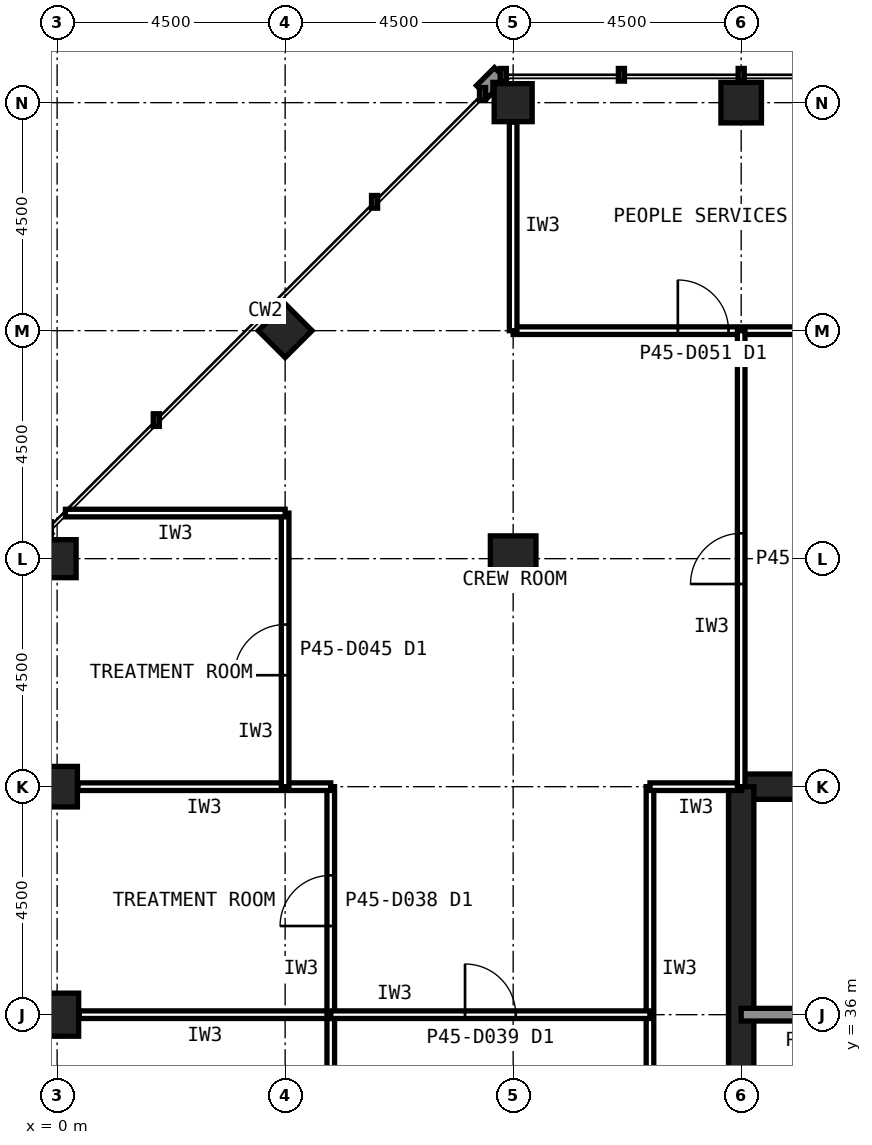
"""IFC4 building model, lengths in metres.
Left out: names, types, materials, properties, quantities, classifications, styles, units other than length and angle.
Written with IfcOpenShell. Run it as: python <this file> out.ifc"""

import sys

from ifc_helpers import new_model, si_unit, direction, frame, frame_2d, origin, origin_2d, place, context, subcontext, project, spatial, rectangle, hollow_rectangle, extrude, element, fill, save


model = new_model("IFC4")
c1 = context("Model", 3, precision=1e-05, world=origin(), true_north=direction((0.0, 1.0)))
c2 = subcontext(c1, "Body", "Model", "MODEL_VIEW")
j1 = project(units=[si_unit("LENGTHUNIT", "METRE"), si_unit("PLANEANGLEUNIT", "RADIAN")], contexts=[c1])
p1 = place(None, origin())
s1 = spatial("IfcSite", under=j1, at=p1, CompositionType="ELEMENT")
p2 = place(p1, origin())
s2 = spatial("IfcBuilding", under=s1, at=p2, CompositionType="ELEMENT")
p3 = place(p2, frame((0.0, 0.0, 191.6)))
s3 = spatial("IfcBuildingStorey", under=s2, at=p3, CompositionType="ELEMENT", Elevation=191.6)
p4 = place(p3, frame((13.5, 54.0, 0.0), z_axis=(0.0, 0.0, 1.0), x_axis=(1.0, 0.0, 0.0)))
e1 = element("IfcColumn", 1, at=p4, inside=s3, PredefinedType="COLUMN", context=c2, shape_type="SweptSolid", body=[
    extrude(hollow_rectangle(XDim=0.8, YDim=0.8, WallThickness=0.045, at=origin_2d()), origin(), (0.0, 0.0, 1.0), 4.0),
])
for number, where, z_axis, x_axis in (
    (2, (9.0, 54.0, 0.0), (0.0, 0.0, 1.0), (1.0, 0.0, 0.0)),
    (3, (0.0, 45.0, 0.0), (0.0, 0.0, 1.0), (1.0, 0.0, 0.0)),
):
    element("IfcColumn", number, at=place(p3, frame(where, z_axis=z_axis, x_axis=x_axis)), inside=s3, PredefinedType="COLUMN", context=c2, shape_type="SweptSolid", body=[
        extrude(hollow_rectangle(XDim=0.75, YDim=0.75, WallThickness=0.04, at=origin_2d()), origin(), (0.0, 0.0, 1.0), 4.0),
    ])
p5 = place(p3, frame((0.0, 40.5, 0.0), z_axis=(0.0, 0.0, 1.0), x_axis=(1.0, 0.0, 0.0)))
e4 = element("IfcColumn", 4, at=p5, inside=s3, PredefinedType="COLUMN", context=c2, shape_type="SweptSolid", body=[
    extrude(hollow_rectangle(XDim=0.8, YDim=0.8, WallThickness=0.045, at=origin_2d()), origin(), (0.0, 0.0, 1.0), 4.0),
])
p6 = place(p3, frame((0.0, 36.0, 0.0), z_axis=(0.0, 0.0, 1.0), x_axis=(1.0, 0.0, 0.0)))
e5 = element("IfcColumn", 5, at=p6, inside=s3, PredefinedType="COLUMN", context=c2, shape_type="SweptSolid", body=[
    extrude(hollow_rectangle(XDim=0.85, YDim=0.85, WallThickness=0.05, at=origin_2d()), origin(), (0.0, 0.0, 1.0), 4.0),
])
p7 = place(p3, frame((4.5, 49.5, 0.0), z_axis=(0.0, 0.0, 1.0), x_axis=(0.707106781187, 0.707106781187, 0.0)))
e6 = element("IfcColumn", 6, at=p7, inside=s3, PredefinedType="COLUMN", context=c2, shape_type="SweptSolid", body=[
    extrude(hollow_rectangle(XDim=0.75, YDim=0.75, WallThickness=0.04, at=origin_2d()), origin(), (0.0, 0.0, 1.0), 4.0),
])
p8 = place(p3, frame((9.0, 45.0, 0.0), z_axis=(0.0, 0.0, 1.0), x_axis=(1.0, 0.0, 0.0)))
e7 = element("IfcColumn", 7, at=p8, inside=s3, PredefinedType="COLUMN", context=c2, shape_type="SweptSolid", body=[
    extrude(hollow_rectangle(XDim=0.9, YDim=0.9, WallThickness=0.063, at=origin_2d()), origin(), (0.0, 0.0, 1.0), 4.0),
])
p9 = place(p3, frame((40.5, 40.5, 0.0), z_axis=(0.0, 0.0, 1.0), x_axis=(-1.0, 0.0, 0.0)))
e8 = element("IfcWall", 8, at=p9, inside=s3, PredefinedType="SHEAR", context=c2, shape_type="SweptSolid", body=[
    extrude(rectangle(XDim=27.0, YDim=0.5, at=frame_2d((13.5, 0.0))), origin(), (0.0, 0.0, 1.0), 4.0),
])
p10 = place(p3, frame((13.5, 40.5, 0.0), z_axis=(0.0, 0.0, 1.0), x_axis=(0.0, -1.0, 0.0)))
e9 = element("IfcWall", 9, at=p10, inside=s3, PredefinedType="SHEAR", context=c2, shape_type="SweptSolid", body=[
    extrude(rectangle(XDim=27.0, YDim=0.5, at=frame_2d((13.5, 0.0))), origin(), (0.0, 0.0, 1.0), 4.0),
])
p11 = place(p10, frame((19.65, 0.0, 0.0)))
e10 = element("IfcOpeningElement", 10, at=p11, cuts=e9, PredefinedType="OPENING", context=c2, shape_type="SweptSolid", body=[
    extrude(rectangle(XDim=1.2, YDim=2.1, at=frame_2d((0.6, 1.05))), frame((0.0, 0.26, 0.0), z_axis=(0.0, -1.0, 0.0), x_axis=(1.0, 0.0, 0.0)), (0.0, 0.0, 1.0), 0.52),
])
p12 = place(p10, frame((5.85, 0.0, 0.0)))
e11 = element("IfcOpeningElement", 11, at=p12, cuts=e9, PredefinedType="OPENING", context=c2, shape_type="SweptSolid", body=[
    extrude(rectangle(XDim=1.8, YDim=2.1, at=frame_2d((0.9, 1.05))), frame((0.0, 0.26, 0.0), z_axis=(0.0, -1.0, 0.0), x_axis=(1.0, 0.0, 0.0)), (0.0, 0.0, 1.0), 0.52),
])
p13 = place(p3, frame((13.5, 36.0, 0.0), z_axis=(0.0, 0.0, 1.0), x_axis=(1.0, 0.0, 0.0)))
e12 = element("IfcWall", 12, at=p13, inside=s3, PredefinedType="SOLIDWALL", context=c2, shape_type="SweptSolid", body=[
    extrude(rectangle(XDim=27.0, YDim=0.25, at=frame_2d((13.5, 0.0))), origin(), (0.0, 0.0, 1.0), 3.84),
])
p14 = place(p13, frame((1.8, 0.0, 0.0)))
e13 = element("IfcOpeningElement", 13, at=p14, cuts=e12, PredefinedType="OPENING", context=c2, shape_type="SweptSolid", body=[
    extrude(rectangle(XDim=0.9, YDim=2.1, at=frame_2d((0.45, 1.05))), frame((0.0, 0.135, 0.0), z_axis=(0.0, -1.0, 0.0), x_axis=(1.0, 0.0, 0.0)), (0.0, 0.0, 1.0), 0.27),
])
p15 = place(p13, frame((5.55, 0.0, 0.0)))
e14 = element("IfcOpeningElement", 14, at=p15, cuts=e12, PredefinedType="OPENING", context=c2, shape_type="SweptSolid", body=[
    extrude(rectangle(XDim=0.9, YDim=2.1, at=frame_2d((0.45, 1.05))), frame((0.0, 0.135, 0.0), z_axis=(0.0, -1.0, 0.0), x_axis=(1.0, 0.0, 0.0)), (0.0, 0.0, 1.0), 0.27),
])
p16 = place(p13, frame((8.55, 0.0, 0.0)))
e15 = element("IfcOpeningElement", 15, at=p16, cuts=e12, PredefinedType="OPENING", context=c2, shape_type="SweptSolid", body=[
    extrude(rectangle(XDim=0.9, YDim=2.1, at=frame_2d((0.45, 1.05))), frame((0.0, 0.135, 0.0), z_axis=(0.0, -1.0, 0.0), x_axis=(1.0, 0.0, 0.0)), (0.0, 0.0, 1.0), 0.27),
])
p17 = place(p13, frame((11.55, 0.0, 0.0)))
e16 = element("IfcOpeningElement", 16, at=p17, cuts=e12, PredefinedType="OPENING", context=c2, shape_type="SweptSolid", body=[
    extrude(rectangle(XDim=0.9, YDim=2.1, at=frame_2d((0.45, 1.05))), frame((0.0, 0.135, 0.0), z_axis=(0.0, -1.0, 0.0), x_axis=(1.0, 0.0, 0.0)), (0.0, 0.0, 1.0), 0.27),
])
p18 = place(p13, frame((24.1, 0.0, 0.0)))
e17 = element("IfcOpeningElement", 17, at=p18, cuts=e12, PredefinedType="OPENING", context=c2, shape_type="SweptSolid", body=[
    extrude(rectangle(XDim=1.3, YDim=2.2, at=frame_2d((0.65, 1.1))), frame((0.0, 0.135, 0.0), z_axis=(0.0, -1.0, 0.0), x_axis=(1.0, 0.0, 0.0)), (0.0, 0.0, 1.0), 0.27),
])
p19 = place(p3, frame((11.7, 40.5, 0.0), z_axis=(0.0, 0.0, 1.0), x_axis=(0.0, -1.0, 0.0)))
e18 = element("IfcWall", 18, at=p19, inside=s3, PredefinedType="PARTITIONING", context=c2, shape_type="SweptSolid", body=[
    extrude(rectangle(XDim=7.2, YDim=0.15, at=frame_2d((3.6, 0.0))), origin(), (0.0, 0.0, 1.0), 3.84),
])
p20 = place(p3, frame((13.51, 40.5, 0.0), z_axis=(0.0, 0.0, 1.0), x_axis=(-1.0, 0.0, 0.0)))
e19 = element("IfcWall", 19, at=p20, inside=s3, PredefinedType="PARTITIONING", context=c2, shape_type="SweptSolid", body=[
    extrude(rectangle(XDim=1.81, YDim=0.15, at=frame_2d((0.905, 0.0))), origin(), (0.0, 0.0, 1.0), 2.989),
])
p21 = place(p3, frame((5.4, 31.5, 0.0), z_axis=(0.0, 0.0, 1.0), x_axis=(0.0, 1.0, 0.0)))
e20 = element("IfcWall", 20, at=p21, inside=s3, PredefinedType="PARTITIONING", context=c2, shape_type="SweptSolid", body=[
    extrude(rectangle(XDim=4.5, YDim=0.15, at=frame_2d((2.25, 0.0))), origin(), (0.0, 0.0, 1.0), 3.84),
])
p22 = place(p21, frame((1.75, 0.0, 0.0)))
e21 = element("IfcOpeningElement", 21, at=p22, cuts=e20, PredefinedType="OPENING", context=c2, shape_type="SweptSolid", body=[
    extrude(rectangle(XDim=1.0, YDim=2.1, at=frame_2d((0.5, 1.05))), frame((0.0, 0.085, 0.0), z_axis=(0.0, -1.0, 0.0), x_axis=(1.0, 0.0, 0.0)), (0.0, 0.0, 1.0), 0.17),
])
p23 = place(p3, frame((5.4, 36.0, 0.0), z_axis=(0.0, 0.0, 1.0), x_axis=(-1.0, 0.0, 0.0)))
e22 = element("IfcWall", 22, at=p23, inside=s3, PredefinedType="PARTITIONING", context=c2, shape_type="SweptSolid", body=[
    extrude(rectangle(XDim=4.965, YDim=0.15, at=frame_2d((2.482, 0.0))), origin(), (0.0, 0.0, 1.0), 2.989),
])
p24 = place(p3, frame((5.4, 36.0, 0.0), z_axis=(0.0, 0.0, 1.0), x_axis=(0.0, 1.0, 0.0)))
e23 = element("IfcWall", 23, at=p24, inside=s3, PredefinedType="PARTITIONING", context=c2, shape_type="SweptSolid", body=[
    extrude(rectangle(XDim=4.5, YDim=0.15, at=frame_2d((2.25, 0.0))), origin(), (0.0, 0.0, 1.0), 3.84),
])
p25 = place(p24, frame((1.75, 0.0, 0.0)))
e24 = element("IfcOpeningElement", 24, at=p25, cuts=e23, PredefinedType="OPENING", context=c2, shape_type="SweptSolid", body=[
    extrude(rectangle(XDim=1.0, YDim=2.1, at=frame_2d((0.5, 1.05))), frame((0.0, 0.085, 0.0), z_axis=(0.0, -1.0, 0.0), x_axis=(1.0, 0.0, 0.0)), (0.0, 0.0, 1.0), 0.17),
])
p26 = place(p3, frame((5.4, 40.5, 0.0), z_axis=(0.0, 0.0, 1.0), x_axis=(-1.0, 0.0, 0.0)))
e25 = element("IfcWall", 25, at=p26, inside=s3, PredefinedType="PARTITIONING", context=c2, shape_type="SweptSolid", body=[
    extrude(rectangle(XDim=4.99, YDim=0.15, at=frame_2d((2.495, 0.0))), origin(), (0.0, 0.0, 1.0), 2.989),
])
p27 = place(p3, frame((4.5, 40.5, 0.0), z_axis=(0.0, 0.0, 1.0), x_axis=(0.0, 1.0, 0.0)))
e26 = element("IfcWall", 26, at=p27, inside=s3, PredefinedType="PARTITIONING", context=c2, shape_type="SweptSolid", body=[
    extrude(rectangle(XDim=5.4, YDim=0.15, at=frame_2d((2.7, 0.0))), origin(), (0.0, 0.0, 1.0), 3.84),
])
p28 = place(p27, frame((2.2, 0.0, 0.0)))
e27 = element("IfcOpeningElement", 27, at=p28, cuts=e26, PredefinedType="OPENING", context=c2, shape_type="SweptSolid", body=[
    extrude(rectangle(XDim=1.0, YDim=2.1, at=frame_2d((0.5, 1.05))), frame((0.0, 0.085, 0.0), z_axis=(0.0, -1.0, 0.0), x_axis=(1.0, 0.0, 0.0)), (0.0, 0.0, 1.0), 0.17),
])
p29 = place(p3, frame((4.5, 45.9, 0.0), z_axis=(0.0, 0.0, 1.0), x_axis=(-1.0, 0.0, 0.0)))
e28 = element("IfcWall", 28, at=p29, inside=s3, PredefinedType="PARTITIONING", context=c2, shape_type="SweptSolid", body=[
    extrude(rectangle(XDim=4.335, YDim=0.15, at=frame_2d((2.168, 0.0))), origin(), (0.0, 0.0, 1.0), 3.84),
])
p30 = place(p3, frame((9.0, 49.5, 0.0), z_axis=(0.0, 0.0, 1.0), x_axis=(1.0, 0.0, 0.0)))
e29 = element("IfcWall", 29, at=p30, inside=s3, PredefinedType="PARTITIONING", context=c2, shape_type="SweptSolid", body=[
    extrude(rectangle(XDim=9.0, YDim=0.15, at=frame_2d((4.5, 0.0))), origin(), (0.0, 0.0, 1.0), 3.84),
])
p31 = place(p30, frame((3.25, 0.0, 0.0)))
e30 = element("IfcOpeningElement", 30, at=p31, cuts=e29, PredefinedType="OPENING", context=c2, shape_type="SweptSolid", body=[
    extrude(rectangle(XDim=1.0, YDim=2.1, at=frame_2d((0.5, 1.05))), frame((0.0, 0.085, 0.0), z_axis=(0.0, -1.0, 0.0), x_axis=(1.0, 0.0, 0.0)), (0.0, 0.0, 1.0), 0.17),
])
p32 = place(p3, frame((9.0, 53.615, 0.0), z_axis=(0.0, 0.0, 1.0), x_axis=(0.0, -1.0, 0.0)))
e31 = element("IfcWall", 31, at=p32, inside=s3, PredefinedType="PARTITIONING", context=c2, shape_type="SweptSolid", body=[
    extrude(rectangle(XDim=4.115, YDim=0.15, at=frame_2d((2.058, 0.0))), origin(), (0.0, 0.0, 1.0), 3.229),
])
p33 = place(p3, frame((5.4, 36.0, 0.0), z_axis=(0.0, 0.0, 1.0), x_axis=(1.0, 0.0, 0.0)))
e32 = element("IfcWall", 32, at=p33, inside=s3, PredefinedType="PARTITIONING", context=c2, shape_type="SweptSolid", body=[
    extrude(rectangle(XDim=6.3, YDim=0.15, at=frame_2d((3.15, 0.0))), origin(), (0.0, 0.0, 1.0), 2.989),
])
p34 = place(p33, frame((2.65, 0.0, 0.0)))
e33 = element("IfcOpeningElement", 33, at=p34, cuts=e32, PredefinedType="OPENING", context=c2, shape_type="SweptSolid", body=[
    extrude(rectangle(XDim=1.0, YDim=2.1, at=frame_2d((0.5, 1.05))), frame((0.0, 0.085, 0.0), z_axis=(0.0, -1.0, 0.0), x_axis=(1.0, 0.0, 0.0)), (0.0, 0.0, 1.0), 0.17),
])
p35 = place(p3, frame((13.5, 40.5, 0.0), z_axis=(0.0, 0.0, 1.0), x_axis=(0.0, 1.0, 0.0)))
e34 = element("IfcWall", 34, at=p35, inside=s3, PredefinedType="PARTITIONING", context=c2, shape_type="SweptSolid", body=[
    extrude(rectangle(XDim=9.0, YDim=0.15, at=frame_2d((4.5, 0.0))), origin(), (0.0, 0.0, 1.0), 2.989),
])
p36 = place(p35, frame((4.0, 0.0, 0.0)))
e35 = element("IfcOpeningElement", 35, at=p36, cuts=e34, PredefinedType="OPENING", context=c2, shape_type="SweptSolid", body=[
    extrude(rectangle(XDim=1.0, YDim=2.1, at=frame_2d((0.5, 1.05))), frame((0.0, 0.085, 0.0), z_axis=(0.0, -1.0, 0.0), x_axis=(1.0, 0.0, 0.0)), (0.0, 0.0, 1.0), 0.17),
])
p37 = place(p25, origin())
e36 = element("IfcDoor", 36, at=p37, inside=s3, OperationType="SINGLE_SWING_LEFT", PredefinedType="DOOR", context=c2, shape_type="SweptSolid", body=[
    extrude(rectangle(XDim=1.0, YDim=2.1, at=frame_2d((0.5, 1.05))), frame((0.0, 0.025, 0.0), z_axis=(0.0, -1.0, 0.0), x_axis=(1.0, 0.0, 0.0)), (0.0, 0.0, 1.0), 0.05),
])
fill(e24, e36)
p38 = place(p28, origin())
e37 = element("IfcDoor", 37, at=p38, inside=s3, OperationType="SINGLE_SWING_LEFT", PredefinedType="DOOR", context=c2, shape_type="SweptSolid", body=[
    extrude(rectangle(XDim=1.0, YDim=2.1, at=frame_2d((0.5, 1.05))), frame((0.0, 0.025, 0.0), z_axis=(0.0, -1.0, 0.0), x_axis=(1.0, 0.0, 0.0)), (0.0, 0.0, 1.0), 0.05),
])
fill(e27, e37)
p39 = place(p31, origin())
e38 = element("IfcDoor", 38, at=p39, inside=s3, OperationType="SINGLE_SWING_LEFT", PredefinedType="DOOR", context=c2, shape_type="SweptSolid", body=[
    extrude(rectangle(XDim=1.0, YDim=2.1, at=frame_2d((0.5, 1.05))), frame((0.0, 0.025, 0.0), z_axis=(0.0, -1.0, 0.0), x_axis=(1.0, 0.0, 0.0)), (0.0, 0.0, 1.0), 0.05),
])
fill(e30, e38)
p40 = place(p34, origin())
e39 = element("IfcDoor", 39, at=p40, inside=s3, OperationType="SINGLE_SWING_LEFT", PredefinedType="DOOR", context=c2, shape_type="SweptSolid", body=[
    extrude(rectangle(XDim=1.0, YDim=2.1, at=frame_2d((0.5, 1.05))), frame((0.0, 0.025, 0.0), z_axis=(0.0, -1.0, 0.0), x_axis=(1.0, 0.0, 0.0)), (0.0, 0.0, 1.0), 0.05),
])
fill(e33, e39)
p41 = place(p36, origin())
e40 = element("IfcDoor", 40, at=p41, inside=s3, OperationType="SINGLE_SWING_LEFT", PredefinedType="DOOR", context=c2, shape_type="SweptSolid", body=[
    extrude(rectangle(XDim=1.0, YDim=2.1, at=frame_2d((0.5, 1.05))), frame((0.0, 0.025, 0.0), z_axis=(0.0, -1.0, 0.0), x_axis=(1.0, 0.0, 0.0)), (0.0, 0.0, 1.0), 0.05),
])
fill(e35, e40)
save(model, sys.argv[1])
